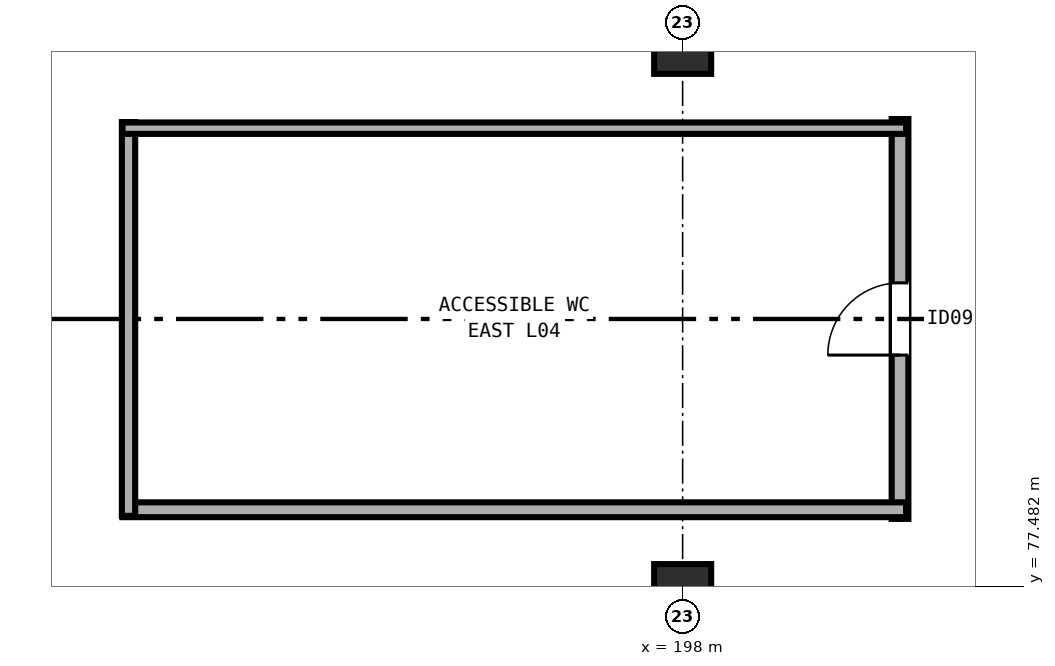
"""IFC4 building model, lengths in metres.
Left out: names, types, materials, properties, quantities, classifications, styles, units other than length and angle.
Written with IfcOpenShell. Run it as: python <this file> out.ifc"""

import sys

from ifc_helpers import new_model, si_unit, direction, frame, frame_2d, origin, origin_2d, place, context, subcontext, project, spatial, rectangle, extrude, element, fill, save


model = new_model("IFC4")
c1 = context("Model", 3, precision=1e-05, world=origin(), true_north=direction((0.0, 1.0)))
c2 = subcontext(c1, "Body", "Model", "MODEL_VIEW")
j1 = project(units=[si_unit("LENGTHUNIT", "METRE"), si_unit("PLANEANGLEUNIT", "RADIAN")], contexts=[c1])
p1 = place(None, origin())
s1 = spatial("IfcSite", under=j1, at=p1, CompositionType="ELEMENT")
p2 = place(p1, origin())
s2 = spatial("IfcBuilding", under=s1, at=p2, CompositionType="ELEMENT")
p3 = place(p2, frame((0.0, 0.0, 19.2)))
s3 = spatial("IfcBuildingStorey", under=s2, at=p3, CompositionType="ELEMENT", Elevation=19.2)
for number, where, z_axis, x_axis in (
    (1, (198.0, 77.4, 0.0), (0.0, 0.0, 1.0), (1.0, 0.0, 0.0)),
    (2, (198.0, 84.6, 0.0), (0.0, 0.0, 1.0), (1.0, 0.0, 0.0)),
):
    element("IfcColumn", number, at=place(p3, frame(where, z_axis=z_axis, x_axis=x_axis)), inside=s3, PredefinedType="COLUMN", context=c2, shape_type="SweptSolid", body=[
        extrude(rectangle(XDim=0.75, YDim=0.75, at=origin_2d()), origin(), (0.0, 0.0, 1.0), 4.8),
    ])
p4 = place(p3, frame((200.86, 78.37, 0.0), z_axis=(0.0, 0.0, 1.0), x_axis=(0.0, 1.0, 0.0)))
e3 = element("IfcWall", 3, at=p4, inside=s3, PredefinedType="PARTITIONING", context=c2, shape_type="SweptSolid", body=[
    extrude(rectangle(XDim=5.26, YDim=0.22, at=frame_2d((2.63, 0.0))), origin(), (0.0, 0.0, 1.0), 3.28),
])
p5 = place(p4, frame((2.155, 0.0, 0.0)))
e4 = element("IfcOpeningElement", 4, at=p5, cuts=e3, PredefinedType="OPENING", context=c2, shape_type="SweptSolid", body=[
    extrude(rectangle(XDim=0.95, YDim=2.1, at=frame_2d((0.475, 1.05))), frame((0.0, 0.12, 0.0), z_axis=(0.0, -1.0, 0.0), x_axis=(1.0, 0.0, 0.0)), (0.0, 0.0, 1.0), 0.24),
])
p6 = place(p3, frame((200.94, 78.49, 0.0), z_axis=(0.0, 0.0, 1.0), x_axis=(-1.0, 0.0, 0.0)))
e5 = element("IfcWall", 5, at=p6, inside=s3, PredefinedType="PARTITIONING", context=c2, shape_type="SweptSolid", body=[
    extrude(rectangle(XDim=10.31, YDim=0.195, at=frame_2d((5.155, 0.0))), origin(), (0.0, 0.0, 1.0), 3.28),
])
p7 = place(p3, frame((190.71, 78.41, 0.0), z_axis=(0.0, 0.0, 1.0), x_axis=(0.0, 1.0, 0.0)))
e6 = element("IfcWall", 6, at=p7, inside=s3, PredefinedType="PARTITIONING", context=c2, shape_type="SweptSolid", body=[
    extrude(rectangle(XDim=5.18, YDim=0.175, at=frame_2d((2.59, 0.0))), origin(), (0.0, 0.0, 1.0), 3.28),
])
p8 = place(p3, frame((190.63, 83.51, 0.0), z_axis=(0.0, 0.0, 1.0), x_axis=(1.0, 0.0, 0.0)))
e7 = element("IfcWall", 7, at=p8, inside=s3, PredefinedType="PARTITIONING", context=c2, shape_type="SweptSolid", body=[
    extrude(rectangle(XDim=10.31, YDim=0.15, at=frame_2d((5.155, 0.0))), origin(), (0.0, 0.0, 1.0), 3.28),
])
p9 = place(p5, origin())
e8 = element("IfcDoor", 8, at=p9, inside=s3, OperationType="SINGLE_SWING_LEFT", PredefinedType="DOOR", context=c2, shape_type="SweptSolid", body=[
    extrude(rectangle(XDim=0.95, YDim=2.1, at=frame_2d((0.475, 1.05))), frame((0.0, 0.025, 0.0), z_axis=(0.0, -1.0, 0.0), x_axis=(1.0, 0.0, 0.0)), (0.0, 0.0, 1.0), 0.05),
])
fill(e4, e8)
save(model, sys.argv[1])
